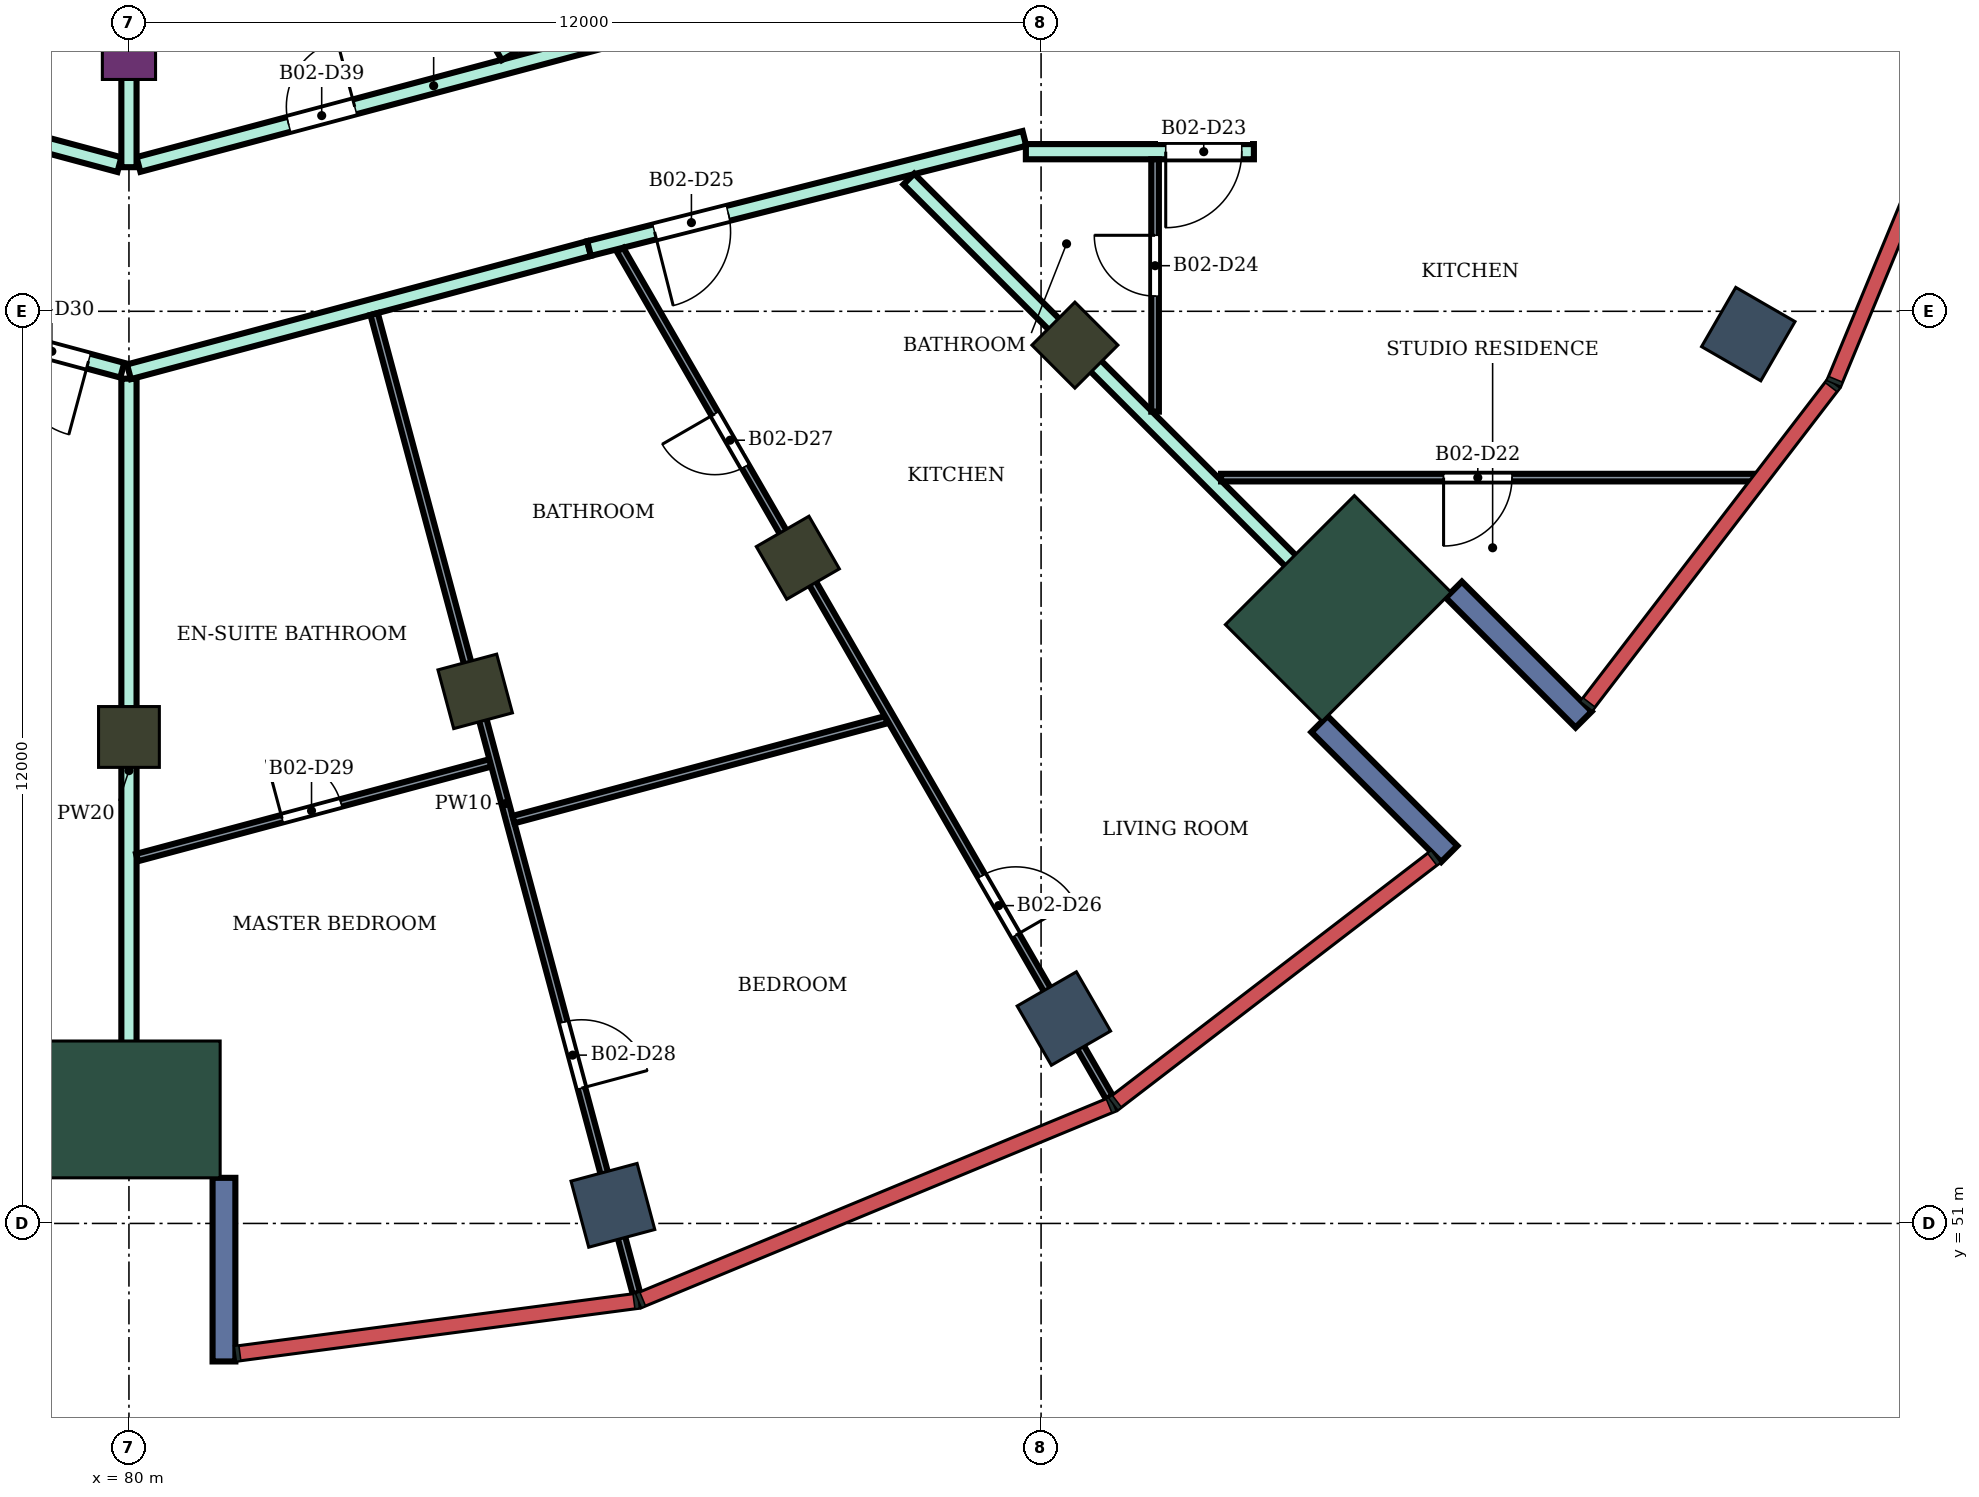
"""IFC4 building model, lengths in metres.
Left out: names, types, materials, properties, quantities, classifications, styles, units other than length and angle.
Written with IfcOpenShell. Run it as: python <this file> out.ifc"""

import sys

from ifc_helpers import new_model, si_unit, direction, frame, frame_2d, origin, origin_2d, place, context, subcontext, project, spatial, rectangle, extrude, element, fill, save


model = new_model("IFC4")
c1 = context("Model", 3, precision=1e-05, world=origin(), true_north=direction((0.0, 1.0)))
c2 = subcontext(c1, "Body", "Model", "MODEL_VIEW")
j1 = project(units=[si_unit("LENGTHUNIT", "METRE"), si_unit("PLANEANGLEUNIT", "RADIAN")], contexts=[c1])
p1 = place(None, origin())
s1 = spatial("IfcSite", under=j1, at=p1, CompositionType="ELEMENT")
p2 = place(p1, origin())
s2 = spatial("IfcBuilding", under=s1, at=p2, CompositionType="ELEMENT")
p3 = place(p2, frame((0.0, 0.0, 220.9)))
s3 = spatial("IfcBuildingStorey", under=s2, at=p3, CompositionType="ELEMENT", Elevation=220.9)
for number, where, z_axis, x_axis in (
    (1, (86.367, 51.238, 0.0), (0.0, 0.0, 1.0), (0.259, -0.966, 0.0)),
    (2, (92.3, 53.696, 0.0), (0.0, 0.0, 1.0), (0.5, -0.866, 0.0)),
    (3, (101.304, 62.7, 0.0), (0.0, 0.0, 1.0), (0.866, -0.5, 0.0)),
):
    element("IfcColumn", number, at=place(p3, frame(where, z_axis=z_axis, x_axis=x_axis)), inside=s3, PredefinedType="COLUMN", context=c2, shape_type="SweptSolid", body=[
        extrude(rectangle(XDim=0.9, YDim=0.9, at=origin_2d()), origin(), (0.0, 0.0, 1.0), 4.2),
    ])
for number, where, z_axis, x_axis in (
    (4, (80.0, 57.4, 0.0), (0.0, 0.0, 1.0), (0.0, -1.0, 0.0)),
    (5, (84.555, 58.0, 0.0), (0.0, 0.0, 1.0), (0.259, -0.966, 0.0)),
    (6, (88.8, 59.758, 0.0), (0.0, 0.0, 1.0), (0.5, -0.866, 0.0)),
    (7, (92.445, 62.555, 0.0), (0.0, 0.0, 1.0), (0.707, -0.707, 0.0)),
):
    element("IfcColumn", number, at=place(p3, frame(where, z_axis=z_axis, x_axis=x_axis)), inside=s3, PredefinedType="COLUMN", context=c2, shape_type="SweptSolid", body=[
        extrude(rectangle(XDim=0.8, YDim=0.8, at=origin_2d()), origin(), (0.0, 0.0, 1.0), 4.2),
    ])
p4 = place(p3, frame((80.0, 66.4, 0.0), z_axis=(0.0, 0.0, 1.0), x_axis=(0.0, -1.0, 0.0)))
e8 = element("IfcColumn", 8, at=p4, inside=s3, PredefinedType="COLUMN", context=c2, shape_type="SweptSolid", body=[
    extrude(rectangle(XDim=0.7, YDim=0.7, at=origin_2d()), origin(), (0.0, 0.0, 1.0), 4.2),
])
for number, where, z_axis, x_axis in (
    (9, (80.0, 52.5, 0.0), (0.0, 0.0, 1.0), (0.0, -1.0, 0.0)),
    (10, (95.91, 59.09, 0.0), (0.0, 0.0, 1.0), (0.707, -0.707, 0.0)),
):
    element("IfcColumn", number, at=place(p3, frame(where, z_axis=z_axis, x_axis=x_axis)), inside=s3, PredefinedType="COLUMN", context=c2, shape_type="SweptSolid", body=[
        extrude(rectangle(XDim=1.8, YDim=2.4, at=origin_2d()), origin(), (0.0, 0.0, 1.0), 4.2),
    ])
for number, where, z_axis, x_axis in (
    (11, (81.25, 51.6, 0.0), (0.0, 0.0, 1.0), (0.0, -1.0, 0.0)),
    (12, (95.662, 57.57, 0.0), (0.0, 0.0, 1.0), (0.707, -0.707, 0.0)),
    (13, (97.43, 59.338, 0.0), (0.0, 0.0, 1.0), (0.707, -0.707, 0.0)),
):
    element("IfcWall", number, at=place(p3, frame(where, z_axis=z_axis, x_axis=x_axis)), inside=s3, PredefinedType="NOTDEFINED", context=c2, shape_type="SweptSolid", body=[
        extrude(rectangle(XDim=2.416, YDim=0.3, at=frame_2d((1.208, 0.0))), origin(), (0.0, 0.0, 1.0), 4.2),
    ])
p5 = place(p3, frame((74.15, 63.772, 0.0), z_axis=(0.0, 0.0, 1.0), x_axis=(0.965807109237, -0.259261697417, 0.0)))
e14 = element("IfcWall", 14, at=p5, inside=s3, PredefinedType="PARTITIONING", context=c2, shape_type="SweptSolid", body=[
    extrude(rectangle(XDim=5.967, YDim=0.2, at=frame_2d((2.983, 0.0))), origin(), (0.0, 0.0, 1.0), 3.75),
])
p6 = place(p5, frame((4.507, 0.0, 0.0)))
e15 = element("IfcOpeningElement", 15, at=p6, cuts=e14, PredefinedType="OPENING", context=c2, shape_type="SweptSolid", body=[
    extrude(rectangle(XDim=1.0, YDim=2.1, at=frame_2d((0.5, 1.05))), frame((0.0, 0.11, 0.0), z_axis=(0.0, -1.0, 0.0), x_axis=(1.0, 0.0, 0.0)), (0.0, 0.0, 1.0), 0.22),
])
p7 = place(p3, frame((74.603, 66.342, 0.0), z_axis=(0.0, 0.0, 1.0), x_axis=(0.965920893652, -0.258837453254, 0.0)))
e16 = element("IfcWall", 16, at=p7, inside=s3, PredefinedType="PARTITIONING", context=c2, shape_type="SweptSolid", body=[
    extrude(rectangle(XDim=5.458, YDim=0.2, at=frame_2d((2.729, 0.0))), origin(), (0.0, 0.0, 1.0), 3.75),
])
p8 = place(p7, frame((2.512, 0.0, 0.0)))
e17 = element("IfcOpeningElement", 17, at=p8, cuts=e16, PredefinedType="OPENING", context=c2, shape_type="SweptSolid", body=[
    extrude(rectangle(XDim=0.9, YDim=2.1, at=frame_2d((0.45, 1.05))), frame((0.0, 0.11, 0.0), z_axis=(0.0, -1.0, 0.0), x_axis=(1.0, 0.0, 0.0)), (0.0, 0.0, 1.0), 0.22),
])
p9 = place(p3, frame((80.125, 64.932, 0.0), z_axis=(0.0, 0.0, 1.0), x_axis=(0.966236955806, 0.257655089674, 0.0)))
e18 = element("IfcWall", 18, at=p9, inside=s3, PredefinedType="PARTITIONING", context=c2, shape_type="SweptSolid", body=[
    extrude(rectangle(XDim=8.039, YDim=0.2, at=frame_2d((4.02, 0.0))), origin(), (0.0, 0.0, 1.0), 3.75),
])
p10 = place(p9, frame((6.298, 0.0, 0.0)))
e19 = element("IfcOpeningElement", 19, at=p10, cuts=e18, PredefinedType="OPENING", context=c2, shape_type="SweptSolid", body=[
    extrude(rectangle(XDim=0.9, YDim=2.1, at=frame_2d((0.45, 1.05))), frame((0.0, 0.11, 0.0), z_axis=(0.0, -1.0, 0.0), x_axis=(1.0, 0.0, 0.0)), (0.0, 0.0, 1.0), 0.22),
])
p11 = place(p9, frame((2.045, 0.0, 0.0)))
e20 = element("IfcOpeningElement", 20, at=p11, cuts=e18, PredefinedType="OPENING", context=c2, shape_type="SweptSolid", body=[
    extrude(rectangle(XDim=0.9, YDim=2.1, at=frame_2d((0.45, 1.05))), frame((0.0, 0.11, 0.0), z_axis=(0.0, -1.0, 0.0), x_axis=(1.0, 0.0, 0.0)), (0.0, 0.0, 1.0), 0.22),
])
p12 = place(p3, frame((80.0, 51.8, 0.0), z_axis=(0.0, 0.0, 1.0), x_axis=(0.0, 1.0, 0.0)))
e21 = element("IfcWall", 21, at=p12, inside=s3, PredefinedType="PARTITIONING", context=c2, shape_type="SweptSolid", body=[
    extrude(rectangle(XDim=10.314, YDim=0.2, at=frame_2d((5.157, 0.0))), origin(), (0.0, 0.0, 1.0), 3.75),
])
p13 = place(p3, frame((80.0, 62.204, 0.0), z_axis=(0.0, 0.0, 1.0), x_axis=(0.965938139786, 0.258773086132, 0.0)))
e22 = element("IfcWall", 22, at=p13, inside=s3, PredefinedType="PARTITIONING", context=c2, shape_type="SweptSolid", body=[
    extrude(rectangle(XDim=6.266, YDim=0.2, at=frame_2d((3.133, 0.0))), origin(), (0.0, 0.0, 1.0), 3.75),
])
p14 = place(p3, frame((80.0, 64.896, 0.0), z_axis=(0.0, 0.0, 1.0), x_axis=(0.0, 1.0, 0.0)))
e23 = element("IfcWall", 23, at=p14, inside=s3, PredefinedType="PARTITIONING", context=c2, shape_type="SweptSolid", body=[
    extrude(rectangle(XDim=2.405, YDim=0.2, at=frame_2d((1.203, 0.0))), origin(), (0.0, 0.0, 1.0), 3.75),
])
p15 = place(p3, frame((83.85, 68.333, 0.0), z_axis=(0.0, 0.0, 1.0), x_axis=(0.500080019051, -0.865979199835, 0.0)))
e24 = element("IfcWall", 24, at=p15, inside=s3, PredefinedType="PARTITIONING", context=c2, shape_type="SweptSolid", body=[
    extrude(rectangle(XDim=2.285, YDim=0.2, at=frame_2d((1.143, 0.0))), origin(), (0.0, 0.0, 1.0), 3.75),
])
p16 = place(p3, frame((86.053, 63.826, 0.0), z_axis=(0.0, 0.0, 1.0), x_axis=(0.969490004987, 0.245130843083, 0.0)))
e25 = element("IfcWall", 25, at=p16, inside=s3, PredefinedType="PARTITIONING", context=c2, shape_type="SweptSolid", body=[
    extrude(rectangle(XDim=5.908, YDim=0.2, at=frame_2d((2.954, 0.0))), origin(), (0.0, 0.0, 1.0), 3.75),
])
p17 = place(p16, frame((0.889, 0.0, 0.0)))
e26 = element("IfcOpeningElement", 26, at=p17, cuts=e25, PredefinedType="OPENING", context=c2, shape_type="SweptSolid", body=[
    extrude(rectangle(XDim=1.0, YDim=2.1, at=frame_2d((0.5, 1.05))), frame((0.0, 0.11, 0.0), z_axis=(0.0, -1.0, 0.0), x_axis=(1.0, 0.0, 0.0)), (0.0, 0.0, 1.0), 0.22),
])
p18 = place(p3, frame((90.26, 64.74, 0.0), z_axis=(0.0, 0.0, 1.0), x_axis=(0.707106781187, -0.707106781187, 0.0)))
e27 = element("IfcWall", 27, at=p18, inside=s3, PredefinedType="PARTITIONING", context=c2, shape_type="SweptSolid", body=[
    extrude(rectangle(XDim=8.69, YDim=0.2, at=frame_2d((4.345, 0.0))), origin(), (0.0, 0.0, 1.0), 3.75),
])
p19 = place(p3, frame((91.8, 65.1, 0.0), z_axis=(0.0, 0.0, 1.0), x_axis=(1.0, 0.0, 0.0)))
e28 = element("IfcWall", 28, at=p19, inside=s3, PredefinedType="PARTITIONING", context=c2, shape_type="SweptSolid", body=[
    extrude(rectangle(XDim=3.0, YDim=0.2, at=frame_2d((1.5, 0.0))), origin(), (0.0, 0.0, 1.0), 3.75),
])
p20 = place(p19, frame((1.84, 0.0, 0.0)))
e29 = element("IfcOpeningElement", 29, at=p20, cuts=e28, PredefinedType="OPENING", context=c2, shape_type="SweptSolid", body=[
    extrude(rectangle(XDim=1.0, YDim=2.1, at=frame_2d((0.5, 1.05))), frame((0.0, 0.11, 0.0), z_axis=(0.0, -1.0, 0.0), x_axis=(1.0, 0.0, 0.0)), (0.0, 0.0, 1.0), 0.22),
])
p21 = place(p3, frame((80.106, 55.813, 0.0), z_axis=(0.0, 0.0, 1.0), x_axis=(0.965936279421, 0.25878003033, 0.0)))
e30 = element("IfcWall", 30, at=p21, inside=s3, PredefinedType="PARTITIONING", context=c2, shape_type="SweptSolid", body=[
    extrude(rectangle(XDim=4.813, YDim=0.1, at=frame_2d((2.407, 0.0))), origin(), (0.0, 0.0, 1.0), 3.75),
])
p22 = place(p21, frame((1.977, 0.0, 0.0)))
e31 = element("IfcOpeningElement", 31, at=p22, cuts=e30, PredefinedType="OPENING", context=c2, shape_type="SweptSolid", body=[
    extrude(rectangle(XDim=0.8, YDim=2.1, at=frame_2d((0.4, 1.05))), frame((0.0, 0.06, 0.0), z_axis=(0.0, -1.0, 0.0), x_axis=(1.0, 0.0, 0.0)), (0.0, 0.0, 1.0), 0.12),
])
p23 = place(p3, frame((83.225, 62.965, 0.0), z_axis=(0.0, 0.0, 1.0), x_axis=(0.258742489642, -0.965946336012, 0.0)))
e32 = element("IfcWall", 32, at=p23, inside=s3, PredefinedType="PARTITIONING", context=c2, shape_type="SweptSolid", body=[
    extrude(rectangle(XDim=13.338, YDim=0.1, at=frame_2d((6.669, 0.0))), origin(), (0.0, 0.0, 1.0), 3.75),
])
p24 = place(p23, frame((9.644, 0.0, 0.0)))
e33 = element("IfcOpeningElement", 33, at=p24, cuts=e32, PredefinedType="OPENING", context=c2, shape_type="SweptSolid", body=[
    extrude(rectangle(XDim=0.9, YDim=2.1, at=frame_2d((0.45, 1.05))), frame((0.0, 0.06, 0.0), z_axis=(0.0, -1.0, 0.0), x_axis=(1.0, 0.0, 0.0)), (0.0, 0.0, 1.0), 0.12),
])
p25 = place(p3, frame((85.059, 56.313, 0.0), z_axis=(0.0, 0.0, 1.0), x_axis=(0.965911776939, 0.2588714723, 0.0)))
e34 = element("IfcWall", 34, at=p25, inside=s3, PredefinedType="PARTITIONING", context=c2, shape_type="SweptSolid", body=[
    extrude(rectangle(XDim=5.078, YDim=0.1, at=frame_2d((2.539, 0.0))), origin(), (0.0, 0.0, 1.0), 3.75),
])
p26 = place(p3, frame((86.461, 63.81, 0.0), z_axis=(0.0, 0.0, 1.0), x_axis=(0.499925973464, -0.866068138806, 0.0)))
e35 = element("IfcWall", 35, at=p26, inside=s3, PredefinedType="PARTITIONING", context=c2, shape_type="SweptSolid", body=[
    extrude(rectangle(XDim=12.876, YDim=0.1, at=frame_2d((6.438, 0.0))), origin(), (0.0, 0.0, 1.0), 3.75),
])
p27 = place(p26, frame((9.514, 0.0, 0.0)))
e36 = element("IfcOpeningElement", 36, at=p27, cuts=e35, PredefinedType="OPENING", context=c2, shape_type="SweptSolid", body=[
    extrude(rectangle(XDim=0.9, YDim=2.1, at=frame_2d((0.45, 1.05))), frame((0.0, 0.06, 0.0), z_axis=(0.0, -1.0, 0.0), x_axis=(1.0, 0.0, 0.0)), (0.0, 0.0, 1.0), 0.12),
])
p28 = place(p26, frame((2.494, 0.0, 0.0)))
e37 = element("IfcOpeningElement", 37, at=p28, cuts=e35, PredefinedType="OPENING", context=c2, shape_type="SweptSolid", body=[
    extrude(rectangle(XDim=0.8, YDim=2.1, at=frame_2d((0.4, 1.05))), frame((0.0, 0.06, 0.0), z_axis=(0.0, -1.0, 0.0), x_axis=(1.0, 0.0, 0.0)), (0.0, 0.0, 1.0), 0.12),
])
p29 = place(p3, frame((93.5, 61.68, 0.0), z_axis=(0.0, 0.0, 1.0), x_axis=(0.0, 1.0, 0.0)))
e38 = element("IfcWall", 38, at=p29, inside=s3, PredefinedType="PARTITIONING", context=c2, shape_type="SweptSolid", body=[
    extrude(rectangle(XDim=3.32, YDim=0.1, at=frame_2d((1.66, 0.0))), origin(), (0.0, 0.0, 1.0), 3.75),
])
p30 = place(p29, frame((1.52, 0.0, 0.0)))
e39 = element("IfcOpeningElement", 39, at=p30, cuts=e38, PredefinedType="OPENING", context=c2, shape_type="SweptSolid", body=[
    extrude(rectangle(XDim=0.8, YDim=2.1, at=frame_2d((0.4, 1.05))), frame((0.0, 0.06, 0.0), z_axis=(0.0, -1.0, 0.0), x_axis=(1.0, 0.0, 0.0)), (0.0, 0.0, 1.0), 0.12),
])
p31 = place(p3, frame((94.368, 60.812, 0.0), z_axis=(0.0, 0.0, 1.0), x_axis=(1.0, 0.0, 0.0)))
e40 = element("IfcWall", 40, at=p31, inside=s3, PredefinedType="PARTITIONING", context=c2, shape_type="SweptSolid", body=[
    extrude(rectangle(XDim=7.032, YDim=0.1, at=frame_2d((3.516, 0.0))), origin(), (0.0, 0.0, 1.0), 3.75),
])
p32 = place(p31, frame((2.927, 0.0, 0.0)))
e41 = element("IfcOpeningElement", 41, at=p32, cuts=e40, PredefinedType="OPENING", context=c2, shape_type="SweptSolid", body=[
    extrude(rectangle(XDim=0.9, YDim=2.1, at=frame_2d((0.45, 1.05))), frame((0.0, 0.06, 0.0), z_axis=(0.0, -1.0, 0.0), x_axis=(1.0, 0.0, 0.0)), (0.0, 0.0, 1.0), 0.12),
])
p33 = place(p32, frame((0.9, 0.0, 0.0), z_axis=(0.0, 0.0, 1.0), x_axis=(-1.0, 0.0, 0.0)))
e42 = element("IfcDoor", 42, at=p33, inside=s3, OperationType="SINGLE_SWING_RIGHT", PredefinedType="DOOR", context=c2, shape_type="SweptSolid", body=[
    extrude(rectangle(XDim=0.9, YDim=2.1, at=frame_2d((0.45, 1.05))), frame((0.0, 0.025, 0.0), z_axis=(0.0, -1.0, 0.0), x_axis=(1.0, 0.0, 0.0)), (0.0, 0.0, 1.0), 0.05),
])
fill(e41, e42)
p34 = place(p20, frame((1.0, 0.0, 0.0), z_axis=(0.0, 0.0, 1.0), x_axis=(-1.0, 0.0, 0.0)))
e43 = element("IfcDoor", 43, at=p34, inside=s3, OperationType="SINGLE_SWING_RIGHT", PredefinedType="DOOR", context=c2, shape_type="SweptSolid", body=[
    extrude(rectangle(XDim=1.0, YDim=2.1, at=frame_2d((0.5, 1.05))), frame((0.0, 0.025, 0.0), z_axis=(0.0, -1.0, 0.0), x_axis=(1.0, 0.0, 0.0)), (0.0, 0.0, 1.0), 0.05),
])
fill(e29, e43)
p35 = place(p30, origin())
e44 = element("IfcDoor", 44, at=p35, inside=s3, OperationType="SINGLE_SWING_RIGHT", PredefinedType="DOOR", context=c2, shape_type="SweptSolid", body=[
    extrude(rectangle(XDim=0.8, YDim=2.1, at=frame_2d((0.4, 1.05))), frame((0.0, 0.025, 0.0), z_axis=(0.0, -1.0, 0.0), x_axis=(1.0, 0.0, 0.0)), (0.0, 0.0, 1.0), 0.05),
])
fill(e39, e44)
p36 = place(p17, frame((1.0, 0.0, 0.0), z_axis=(0.0, 0.0, 1.0), x_axis=(-1.0, 0.0, 0.0)))
e45 = element("IfcDoor", 45, at=p36, inside=s3, OperationType="SINGLE_SWING_RIGHT", PredefinedType="DOOR", context=c2, shape_type="SweptSolid", body=[
    extrude(rectangle(XDim=1.0, YDim=2.1, at=frame_2d((0.5, 1.05))), frame((0.0, 0.025, 0.0), z_axis=(0.0, -1.0, 0.0), x_axis=(1.0, 0.0, 0.0)), (0.0, 0.0, 1.0), 0.05),
])
fill(e26, e45)
p37 = place(p27, origin())
e46 = element("IfcDoor", 46, at=p37, inside=s3, OperationType="SINGLE_SWING_RIGHT", PredefinedType="DOOR", context=c2, shape_type="SweptSolid", body=[
    extrude(rectangle(XDim=0.9, YDim=2.1, at=frame_2d((0.45, 1.05))), frame((0.0, 0.025, 0.0), z_axis=(0.0, -1.0, 0.0), x_axis=(1.0, 0.0, 0.0)), (0.0, 0.0, 1.0), 0.05),
])
fill(e36, e46)
p38 = place(p28, frame((0.8, 0.0, 0.0), z_axis=(0.0, 0.0, 1.0), x_axis=(-1.0, 0.0, 0.0)))
e47 = element("IfcDoor", 47, at=p38, inside=s3, OperationType="SINGLE_SWING_RIGHT", PredefinedType="DOOR", context=c2, shape_type="SweptSolid", body=[
    extrude(rectangle(XDim=0.8, YDim=2.1, at=frame_2d((0.4, 1.05))), frame((0.0, 0.025, 0.0), z_axis=(0.0, -1.0, 0.0), x_axis=(1.0, 0.0, 0.0)), (0.0, 0.0, 1.0), 0.05),
])
fill(e37, e47)
p39 = place(p24, origin())
e48 = element("IfcDoor", 48, at=p39, inside=s3, OperationType="SINGLE_SWING_RIGHT", PredefinedType="DOOR", context=c2, shape_type="SweptSolid", body=[
    extrude(rectangle(XDim=0.9, YDim=2.1, at=frame_2d((0.45, 1.05))), frame((0.0, 0.025, 0.0), z_axis=(0.0, -1.0, 0.0), x_axis=(1.0, 0.0, 0.0)), (0.0, 0.0, 1.0), 0.05),
])
fill(e33, e48)
p40 = place(p22, origin())
e49 = element("IfcDoor", 49, at=p40, inside=s3, OperationType="SINGLE_SWING_LEFT", PredefinedType="DOOR", context=c2, shape_type="SweptSolid", body=[
    extrude(rectangle(XDim=0.8, YDim=2.1, at=frame_2d((0.4, 1.05))), frame((0.0, 0.025, 0.0), z_axis=(0.0, -1.0, 0.0), x_axis=(1.0, 0.0, 0.0)), (0.0, 0.0, 1.0), 0.05),
])
fill(e31, e49)
p41 = place(p6, frame((1.0, 0.0, 0.0), z_axis=(0.0, 0.0, 1.0), x_axis=(-1.0, 0.0, 0.0)))
e50 = element("IfcDoor", 50, at=p41, inside=s3, OperationType="SINGLE_SWING_LEFT", PredefinedType="DOOR", context=c2, shape_type="SweptSolid", body=[
    extrude(rectangle(XDim=1.0, YDim=2.1, at=frame_2d((0.5, 1.05))), frame((0.0, 0.025, 0.0), z_axis=(0.0, -1.0, 0.0), x_axis=(1.0, 0.0, 0.0)), (0.0, 0.0, 1.0), 0.05),
])
fill(e15, e50)
p42 = place(p11, origin())
e51 = element("IfcDoor", 51, at=p42, inside=s3, OperationType="SINGLE_SWING_RIGHT", PredefinedType="DOOR", context=c2, shape_type="SweptSolid", body=[
    extrude(rectangle(XDim=0.9, YDim=2.1, at=frame_2d((0.45, 1.05))), frame((0.0, 0.025, 0.0), z_axis=(0.0, -1.0, 0.0), x_axis=(1.0, 0.0, 0.0)), (0.0, 0.0, 1.0), 0.05),
])
fill(e20, e51)
save(model, sys.argv[1])
